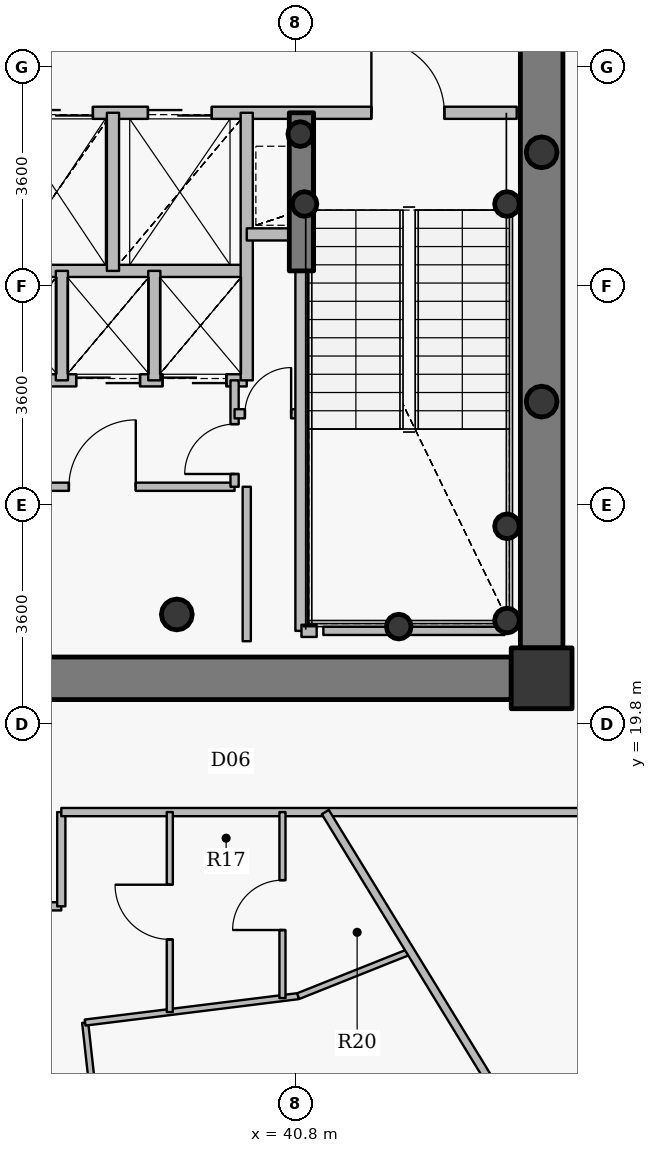
"""IFC4 building model, lengths in metres.
Left out: names, types, materials, properties, quantities, classifications, styles, units other than length and angle.
Written with IfcOpenShell. Run it as: python <this file> out.ifc"""

import sys

from ifc_helpers import new_model, si_unit, direction, frame, frame_2d, origin, origin_2d, place, context, subcontext, project, spatial, rectangle, hollow_circle, extrude, source, transform, mapped, element, fill, save


model = new_model("IFC4")
c1 = context("Model", 3, precision=1e-05, world=origin(), true_north=direction((0.0, 1.0)))
c2 = subcontext(c1, "Body", "Model", "MODEL_VIEW")
j1 = project(units=[si_unit("LENGTHUNIT", "METRE"), si_unit("PLANEANGLEUNIT", "RADIAN")], contexts=[c1])
p1 = place(None, origin())
s1 = spatial("IfcSite", under=j1, at=p1, CompositionType="ELEMENT")
p2 = place(p1, origin())
s2 = spatial("IfcBuilding", under=s1, at=p2, CompositionType="ELEMENT")
p3 = place(p2, frame((0.0, 0.0, 284.25)))
s3 = spatial("IfcBuildingStorey", under=s2, at=p3, CompositionType="ELEMENT", Elevation=284.25)
p4 = place(p3, frame((44.85, 20.55, 0.0), z_axis=(0.0, 0.0, 1.0), x_axis=(1.0, 0.0, 0.0)))
e1 = element("IfcColumn", 1, at=p4, inside=s3, PredefinedType="COLUMN", context=c2, shape_type="SweptSolid", body=[
    extrude(rectangle(XDim=1.0, YDim=1.0, at=origin_2d()), origin(), (0.0, 0.0, 1.0), 3.75),
])
p5 = place(p3, frame((38.85, 21.6, 0.0), z_axis=(0.0, 0.0, 1.0), x_axis=(1.0, 0.0, 0.0)))
e2 = element("IfcColumn", 2, at=p5, inside=s3, PredefinedType="COLUMN", context=c2, shape_type="SweptSolid", body=[
    extrude(hollow_circle(Radius=0.254, WallThickness=0.02, at=origin_2d()), origin(), (0.0, 0.0, 1.0), 3.75),
])
for number, where, z_axis, x_axis in (
    (3, (44.28, 21.5, 0.0), (0.0, 0.0, 1.0), (1.0, 0.0, 0.0)),
    (4, (44.28, 23.05, 0.0), (0.0, 0.0, 1.0), (1.0, 0.0, 0.0)),
    (5, (42.5, 21.4, 0.0), (0.0, 0.0, 1.0), (1.0, 0.0, 0.0)),
    (6, (40.95, 28.35, 0.0), (0.0, 0.0, 1.0), (1.0, 0.0, 0.0)),
    (7, (44.28, 28.35, 0.0), (0.0, 0.0, 1.0), (1.0, 0.0, 0.0)),
    (8, (40.88, 29.5, 0.0), (0.0, 0.0, 1.0), (1.0, 0.0, 0.0)),
):
    element("IfcColumn", number, at=place(p3, frame(where, z_axis=z_axis, x_axis=x_axis)), inside=s3, PredefinedType="COLUMN", context=c2, shape_type="SweptSolid", body=[
        extrude(hollow_circle(Radius=0.203, WallThickness=0.016, at=origin_2d()), origin(), (0.0, 0.0, 1.0), 3.75),
    ])
p6 = place(p3, frame((44.85, 32.95, 0.0), z_axis=(0.0, 0.0, 1.0), x_axis=(0.0, -1.0, 0.0)))
e9 = element("IfcWall", 9, at=p6, inside=s3, PredefinedType="SHEAR", context=c2, shape_type="SweptSolid", body=[
    extrude(rectangle(XDim=11.9, YDim=0.7, at=frame_2d((5.95, 0.0))), origin(), (0.0, 0.0, 1.0), 3.05),
])
p7 = place(p3, frame((44.35, 20.55, 0.0), z_axis=(0.0, 0.0, 1.0), x_axis=(-1.0, 0.0, 0.0)))
e10 = element("IfcWall", 10, at=p7, inside=s3, PredefinedType="SHEAR", context=c2, shape_type="SweptSolid", body=[
    extrude(rectangle(XDim=16.7, YDim=0.7, at=frame_2d((8.35, 0.0))), origin(), (0.0, 0.0, 1.0), 3.05),
])
p8 = place(p7, frame((12.925, 0.0, 0.0)))
e11 = element("IfcOpeningElement", 11, at=p8, cuts=e10, PredefinedType="OPENING", context=c2, shape_type="SweptSolid", body=[
    extrude(rectangle(XDim=1.15, YDim=2.15, at=origin_2d()), frame((0.575, 0.36, 1.075), z_axis=(0.0, -1.0, 0.0), x_axis=(1.0, 0.0, 0.0)), (0.0, 0.0, 1.0), 0.72),
])
p9 = place(p7, frame((9.1, 0.0, 0.0)))
e12 = element("IfcOpeningElement", 12, at=p9, cuts=e10, PredefinedType="OPENING", context=c2, shape_type="SweptSolid", body=[
    extrude(rectangle(XDim=1.15, YDim=2.15, at=origin_2d()), frame((0.575, 0.36, 1.075), z_axis=(0.0, -1.0, 0.0), x_axis=(1.0, 0.0, 0.0)), (0.0, 0.0, 1.0), 0.72),
])
p10 = place(p3, frame((40.9, 27.25, 0.0), z_axis=(0.0, 0.0, 1.0), x_axis=(0.0, 1.0, 0.0)))
e13 = element("IfcWall", 13, at=p10, inside=s3, PredefinedType="SHEAR", context=c2, shape_type="SweptSolid", body=[
    extrude(rectangle(XDim=2.6, YDim=0.4, at=frame_2d((1.3, 0.0))), origin(), (0.0, 0.0, 1.0), 3.1),
])
for number, where, z_axis, x_axis in (
    (14, (44.85, 25.1, 0.0), (0.0, 0.0, 1.0), (1.0, 0.0, 0.0)),
    (15, (44.85, 29.2, 0.0), (0.0, 0.0, 1.0), (1.0, 0.0, 0.0)),
):
    element("IfcColumn", number, at=place(p3, frame(where, z_axis=z_axis, x_axis=x_axis)), inside=s3, PredefinedType="COLUMN", context=c2, shape_type="SweptSolid", body=[
        extrude(hollow_circle(Radius=0.254, WallThickness=0.02, at=origin_2d()), origin(), (0.0, 0.0, 1.0), 3.75),
    ])
p11 = place(p3, frame((35.05, 16.8, 0.0), z_axis=(0.0, 0.0, 1.0), x_axis=(1.0, 0.0, 0.0)))
e16 = element("IfcWall", 16, at=p11, inside=s3, PredefinedType="PARTITIONING", context=c2, shape_type="SweptSolid", body=[
    extrude(rectangle(XDim=1.9, YDim=0.135, at=frame_2d((0.95, 0.0))), origin(), (0.0, 0.0, 1.0), 3.035),
])
p12 = place(p3, frame((35.05, 27.25, 0.0), z_axis=(0.0, 0.0, 1.0), x_axis=(1.0, 0.0, 0.0)))
e17 = element("IfcWall", 17, at=p12, inside=s3, PredefinedType="PARTITIONING", context=c2, shape_type="SweptSolid", body=[
    extrude(rectangle(XDim=4.95, YDim=0.2, at=frame_2d((2.475, 0.0))), origin(), (0.0, 0.0, 1.0), 3.085),
])
p13 = place(p3, frame((35.45, 23.7, 0.0), z_axis=(0.0, 0.0, 1.0), x_axis=(1.0, 0.0, 0.0)))
e18 = element("IfcWall", 18, at=p13, inside=s3, PredefinedType="PARTITIONING", context=c2, shape_type="SweptSolid", body=[
    extrude(rectangle(XDim=4.35, YDim=0.135, at=frame_2d((2.175, 0.0))), origin(), (0.0, 0.0, 1.0), 3.085),
])
p14 = place(p13, frame((1.625, 0.0, 0.0)))
e19 = element("IfcOpeningElement", 19, at=p14, cuts=e18, PredefinedType="OPENING", context=c2, shape_type="SweptSolid", body=[
    extrude(rectangle(XDim=1.1, YDim=2.15, at=origin_2d()), frame((0.55, 0.078, 1.075), z_axis=(0.0, -1.0, 0.0), x_axis=(1.0, 0.0, 0.0)), (0.0, 0.0, 1.0), 0.155),
])
p15 = place(p3, frame((35.45, 25.45, 0.0), z_axis=(0.0, 0.0, 1.0), x_axis=(1.0, 0.0, 0.0)))
e20 = element("IfcWall", 20, at=p15, inside=s3, PredefinedType="PARTITIONING", context=c2, shape_type="SweptSolid", body=[
    extrude(rectangle(XDim=4.55, YDim=0.2, at=frame_2d((2.275, 0.0))), origin(), (0.0, 0.0, 1.0), 3.085),
])
p16 = place(p15, frame((0.25, 0.0, 0.0)))
e21 = element("IfcOpeningElement", 21, at=p16, cuts=e20, PredefinedType="OPENING", context=c2, shape_type="SweptSolid", body=[
    extrude(rectangle(XDim=1.05, YDim=2.15, at=origin_2d()), frame((0.525, 0.11, 1.075), z_axis=(0.0, -1.0, 0.0), x_axis=(1.0, 0.0, 0.0)), (0.0, 0.0, 1.0), 0.22),
])
p17 = place(p15, frame((1.745, 0.0, 0.0)))
e22 = element("IfcOpeningElement", 22, at=p17, cuts=e20, PredefinedType="OPENING", context=c2, shape_type="SweptSolid", body=[
    extrude(rectangle(XDim=1.05, YDim=2.15, at=origin_2d()), frame((0.525, 0.11, 1.075), z_axis=(0.0, -1.0, 0.0), x_axis=(1.0, 0.0, 0.0)), (0.0, 0.0, 1.0), 0.22),
])
p18 = place(p15, frame((3.165, 0.0, 0.0)))
e23 = element("IfcOpeningElement", 23, at=p18, cuts=e20, PredefinedType="OPENING", context=c2, shape_type="SweptSolid", body=[
    extrude(rectangle(XDim=1.05, YDim=2.15, at=origin_2d()), frame((0.525, 0.11, 1.075), z_axis=(0.0, -1.0, 0.0), x_axis=(1.0, 0.0, 0.0)), (0.0, 0.0, 1.0), 0.22),
])
p19 = place(p3, frame((35.95, 29.85, 0.0), z_axis=(0.0, 0.0, 1.0), x_axis=(1.0, 0.0, 0.0)))
e24 = element("IfcWall", 24, at=p19, inside=s3, PredefinedType="PARTITIONING", context=c2, shape_type="SweptSolid", body=[
    extrude(rectangle(XDim=8.49, YDim=0.2, at=frame_2d((4.245, 0.0))), origin(), (0.0, 0.0, 1.0), 3.085),
])
p20 = place(p19, frame((6.1, 0.0, 0.0)))
e25 = element("IfcOpeningElement", 25, at=p20, cuts=e24, PredefinedType="OPENING", context=c2, shape_type="SweptSolid", body=[
    extrude(rectangle(XDim=1.2, YDim=2.15, at=origin_2d()), frame((0.6, 0.11, 1.075), z_axis=(0.0, -1.0, 0.0), x_axis=(1.0, 0.0, 0.0)), (0.0, 0.0, 1.0), 0.22),
])
p21 = place(p19, frame((0.37, 0.0, 0.0)))
e26 = element("IfcOpeningElement", 26, at=p21, cuts=e24, PredefinedType="OPENING", context=c2, shape_type="SweptSolid", body=[
    extrude(rectangle(XDim=1.15, YDim=2.15, at=origin_2d()), frame((0.575, 0.11, 1.075), z_axis=(0.0, -1.0, 0.0), x_axis=(1.0, 0.0, 0.0)), (0.0, 0.0, 1.0), 0.22),
])
p22 = place(p19, frame((2.425, 0.0, 0.0)))
e27 = element("IfcOpeningElement", 27, at=p22, cuts=e24, PredefinedType="OPENING", context=c2, shape_type="SweptSolid", body=[
    extrude(rectangle(XDim=1.05, YDim=2.15, at=origin_2d()), frame((0.525, 0.11, 1.075), z_axis=(0.0, -1.0, 0.0), x_axis=(1.0, 0.0, 0.0)), (0.0, 0.0, 1.0), 0.22),
])
p23 = place(p3, frame((36.95, 16.8, 0.0), z_axis=(0.0, 0.0, 1.0), x_axis=(0.0, 1.0, 0.0)))
e28 = element("IfcWall", 28, at=p23, inside=s3, PredefinedType="PARTITIONING", context=c2, shape_type="SweptSolid", body=[
    extrude(rectangle(XDim=1.55, YDim=0.135, at=frame_2d((0.775, 0.0))), origin(), (0.0, 0.0, 1.0), 3.5),
])
p24 = place(p3, frame((36.95, 18.35, 0.0), z_axis=(0.0, 0.0, 1.0), x_axis=(1.0, 0.0, 0.0)))
e29 = element("IfcWall", 29, at=p24, inside=s3, PredefinedType="PARTITIONING", context=c2, shape_type="SweptSolid", body=[
    extrude(rectangle(XDim=10.1, YDim=0.135, at=frame_2d((5.05, 0.0))), origin(), (0.0, 0.0, 1.0), 3.035),
])
p25 = place(p3, frame((36.96, 25.45, 0.0), z_axis=(0.0, 0.0, 1.0), x_axis=(0.0, 1.0, 0.0)))
e30 = element("IfcWall", 30, at=p25, inside=s3, PredefinedType="PARTITIONING", context=c2, shape_type="SweptSolid", body=[
    extrude(rectangle(XDim=1.8, YDim=0.2, at=frame_2d((0.9, 0.0))), origin(), (0.0, 0.0, 1.0), 3.5),
])
p26 = place(p3, frame((37.342, 14.888, 0.0), z_axis=(0.0, 0.0, 1.0), x_axis=(0.110149295127, -0.993915053102, 0.0)))
e31 = element("IfcWall", 31, at=p26, inside=s3, PredefinedType="PARTITIONING", context=c2, shape_type="SweptSolid", body=[
    extrude(rectangle(XDim=5.222, YDim=0.1, at=frame_2d((2.611, 0.0))), origin(), (0.0, 0.0, 1.0), 2.985),
])
p27 = place(p26, frame((2.161, 0.0, 0.0)))
e32 = element("IfcOpeningElement", 32, at=p27, cuts=e31, PredefinedType="OPENING", context=c2, shape_type="SweptSolid", body=[
    extrude(rectangle(XDim=0.9, YDim=2.1, at=origin_2d()), frame((0.45, 0.06, 1.05), z_axis=(0.0, -1.0, 0.0), x_axis=(1.0, 0.0, 0.0)), (0.0, 0.0, 1.0), 0.12),
])
p28 = place(p3, frame((37.342, 14.888, 0.0), z_axis=(0.0, 0.0, 1.0), x_axis=(0.992393420873, 0.123106856865, 0.0)))
e33 = element("IfcWall", 33, at=p28, inside=s3, PredefinedType="PARTITIONING", context=c2, shape_type="SweptSolid", body=[
    extrude(rectangle(XDim=3.53, YDim=0.1, at=frame_2d((1.765, 0.0))), origin(), (0.0, 0.0, 1.0), 3.035),
])
p29 = place(p3, frame((37.8, 27.25, 0.0), z_axis=(0.0, 0.0, 1.0), x_axis=(0.0, 1.0, 0.0)))
e34 = element("IfcWall", 34, at=p29, inside=s3, PredefinedType="PARTITIONING", context=c2, shape_type="SweptSolid", body=[
    extrude(rectangle(XDim=2.6, YDim=0.2, at=frame_2d((1.3, 0.0))), origin(), (0.0, 0.0, 1.0), 3.5),
])
p30 = place(p3, frame((38.48, 25.45, 0.0), z_axis=(0.0, 0.0, 1.0), x_axis=(0.0, 1.0, 0.0)))
e35 = element("IfcWall", 35, at=p30, inside=s3, PredefinedType="PARTITIONING", context=c2, shape_type="SweptSolid", body=[
    extrude(rectangle(XDim=1.8, YDim=0.2, at=frame_2d((0.9, 0.0))), origin(), (0.0, 0.0, 1.0), 3.5),
])
p31 = place(p3, frame((38.734, 15.061, 0.0), z_axis=(0.0, 0.0, 1.0), x_axis=(0.0, 1.0, 0.0)))
e36 = element("IfcWall", 36, at=p31, inside=s3, PredefinedType="PARTITIONING", context=c2, shape_type="SweptSolid", body=[
    extrude(rectangle(XDim=3.289, YDim=0.1, at=frame_2d((1.645, 0.0))), origin(), (0.0, 0.0, 1.0), 3.5),
])
p32 = place(p31, frame((1.194, 0.0, 0.0)))
e37 = element("IfcOpeningElement", 37, at=p32, cuts=e36, PredefinedType="OPENING", context=c2, shape_type="SweptSolid", body=[
    extrude(rectangle(XDim=0.9, YDim=2.1, at=origin_2d()), frame((0.45, 0.06, 1.05), z_axis=(0.0, -1.0, 0.0), x_axis=(1.0, 0.0, 0.0)), (0.0, 0.0, 1.0), 0.12),
])
p33 = place(p3, frame((39.8, 23.7, 0.0), z_axis=(0.0, 0.0, 1.0), x_axis=(0.0, 1.0, 0.0)))
e38 = element("IfcWall", 38, at=p33, inside=s3, PredefinedType="PARTITIONING", context=c2, shape_type="SweptSolid", body=[
    extrude(rectangle(XDim=1.75, YDim=0.135, at=frame_2d((0.875, 0.0))), origin(), (0.0, 0.0, 1.0), 3.5),
])
p34 = place(p33, frame((0.21, 0.0, 0.0)))
e39 = element("IfcOpeningElement", 39, at=p34, cuts=e38, PredefinedType="OPENING", context=c2, shape_type="SweptSolid", body=[
    extrude(rectangle(XDim=0.82, YDim=2.1, at=origin_2d()), frame((0.41, 0.078, 1.05), z_axis=(0.0, -1.0, 0.0), x_axis=(1.0, 0.0, 0.0)), (0.0, 0.0, 1.0), 0.155),
])
p35 = place(p3, frame((39.8, 24.9, 0.0), z_axis=(0.0, 0.0, 1.0), x_axis=(1.0, 0.0, 0.0)))
e40 = element("IfcWall", 40, at=p35, inside=s3, PredefinedType="PARTITIONING", context=c2, shape_type="SweptSolid", body=[
    extrude(rectangle(XDim=1.1, YDim=0.15, at=frame_2d((0.55, 0.0))), origin(), (0.0, 0.0, 1.0), 3.5),
])
p36 = place(p35, frame((0.17, 0.0, 0.0)))
e41 = element("IfcOpeningElement", 41, at=p36, cuts=e40, PredefinedType="OPENING", context=c2, shape_type="SweptSolid", body=[
    extrude(rectangle(XDim=0.76, YDim=2.1, at=origin_2d()), frame((0.38, 0.085, 1.05), z_axis=(0.0, -1.0, 0.0), x_axis=(1.0, 0.0, 0.0)), (0.0, 0.0, 1.0), 0.17),
])
p37 = place(p3, frame((40.0, 25.45, 0.0), z_axis=(0.0, 0.0, 1.0), x_axis=(0.0, 1.0, 0.0)))
e42 = element("IfcWall", 42, at=p37, inside=s3, PredefinedType="PARTITIONING", context=c2, shape_type="SweptSolid", body=[
    extrude(rectangle(XDim=4.4, YDim=0.2, at=frame_2d((2.2, 0.0))), origin(), (0.0, 0.0, 1.0), 3.5),
])
p38 = place(p3, frame((40.0, 27.85, 0.0), z_axis=(0.0, 0.0, 1.0), x_axis=(1.0, 0.0, 0.0)))
e43 = element("IfcWall", 43, at=p38, inside=s3, PredefinedType="PARTITIONING", context=c2, shape_type="SweptSolid", body=[
    extrude(rectangle(XDim=0.9, YDim=0.2, at=frame_2d((0.45, 0.0))), origin(), (0.0, 0.0, 1.0), 3.5),
])
p39 = place(p3, frame((40.587, 15.291, 0.0), z_axis=(0.0, 0.0, 1.0), x_axis=(0.0, 1.0, 0.0)))
e44 = element("IfcWall", 44, at=p39, inside=s3, PredefinedType="PARTITIONING", context=c2, shape_type="SweptSolid", body=[
    extrude(rectangle(XDim=3.059, YDim=0.1, at=frame_2d((1.53, 0.0))), origin(), (0.0, 0.0, 1.0), 3.035),
])
p40 = place(p39, frame((1.119, 0.0, 0.0)))
e45 = element("IfcOpeningElement", 45, at=p40, cuts=e44, PredefinedType="OPENING", context=c2, shape_type="SweptSolid", body=[
    extrude(rectangle(XDim=0.82, YDim=2.1, at=origin_2d()), frame((0.41, 0.06, 1.05), z_axis=(0.0, -1.0, 0.0), x_axis=(1.0, 0.0, 0.0)), (0.0, 0.0, 1.0), 0.12),
])
p41 = place(p3, frame((40.845, 15.323, 0.0), z_axis=(0.0, 0.0, 1.0), x_axis=(0.928797929692, 0.370586569913, 0.0)))
e46 = element("IfcWall", 46, at=p41, inside=s3, PredefinedType="PARTITIONING", context=c2, shape_type="SweptSolid", body=[
    extrude(rectangle(XDim=1.99, YDim=0.1, at=frame_2d((0.995, 0.0))), origin(), (0.0, 0.0, 1.0), 3.035),
])
p42 = place(p3, frame((40.9, 21.33, 0.0), z_axis=(0.0, 0.0, 1.0), x_axis=(0.0, 1.0, 0.0)))
e47 = element("IfcWall", 47, at=p42, inside=s3, PredefinedType="PARTITIONING", context=c2, shape_type="SweptSolid", body=[
    extrude(rectangle(XDim=5.91, YDim=0.2, at=frame_2d((2.955, 0.0))), origin(), (0.0, 0.0, 1.0), 3.035),
])
p43 = place(p3, frame((40.9, 21.33, 0.0), z_axis=(0.0, 0.0, 1.0), x_axis=(1.0, 0.0, 0.0)))
e48 = element("IfcWall", 48, at=p43, inside=s3, PredefinedType="PARTITIONING", context=c2, shape_type="SweptSolid", body=[
    extrude(rectangle(XDim=0.25, YDim=0.2, at=frame_2d((0.125, 0.0))), origin(), (0.0, 0.0, 1.0), 3.035),
])
p44 = place(p3, frame((41.292, 18.35, 0.0), z_axis=(0.0, 0.0, 1.0), x_axis=(0.521891606098, -0.853011812043, 0.0)))
e49 = element("IfcWall", 49, at=p44, inside=s3, PredefinedType="PARTITIONING", context=c2, shape_type="SweptSolid", body=[
    extrude(rectangle(XDim=8.25, YDim=0.135, at=frame_2d((4.125, 0.0))), origin(), (0.0, 0.0, 1.0), 2.985),
])
p45 = place(p3, frame((44.24, 21.33, 0.0), z_axis=(0.0, 0.0, 1.0), x_axis=(-1.0, 0.0, 0.0)))
e50 = element("IfcWall", 50, at=p45, inside=s3, PredefinedType="PARTITIONING", context=c2, shape_type="SweptSolid", body=[
    extrude(rectangle(XDim=2.98, YDim=0.135, at=frame_2d((1.49, 0.0))), origin(), (0.0, 0.0, 1.0), 3.035),
])
p46 = place(p3, frame((40.0, 23.7, 0.0), z_axis=(0.0, 0.0, 1.0), x_axis=(0.0, -1.0, 0.0)))
e51 = element("IfcWall", 51, at=p46, inside=s3, PredefinedType="PARTITIONING", context=c2, shape_type="SweptSolid", body=[
    extrude(rectangle(XDim=2.54, YDim=0.135, at=frame_2d((1.27, 0.0))), origin(), (0.0, 0.0, 1.0), 3.035),
])
p47 = place(p3, frame((44.36, 20.2, 0.0), z_axis=(0.0, 0.0, 1.0), x_axis=(1.0, 0.0, 0.0)))
e52 = element("IfcWall", 52, at=p47, inside=s3, PredefinedType="PARTITIONING", context=c2, shape_type="SweptSolid", body=[
    extrude(rectangle(XDim=0.84, YDim=0.135, at=frame_2d((0.42, 0.0))), origin(), (0.0, 0.0, 1.0), 3.035),
])
p48 = place(p3, frame((45.2, 20.508, 0.0), z_axis=(0.0, 0.0, 1.0), x_axis=(0.0, 1.0, 0.0)))
e53 = element("IfcWall", 53, at=p48, inside=s3, PredefinedType="PARTITIONING", context=c2, shape_type="SweptSolid", body=[
    extrude(rectangle(XDim=0.532, YDim=0.135, at=frame_2d((0.266, 0.0))), origin(), (0.0, 0.0, 1.0), 3.5),
])
m1 = source(origin(), c2, "Body", "SweptSolid", [
    extrude(rectangle(XDim=1.2, YDim=2.15, at=origin_2d()), frame((0.6, 0.025, 1.075), z_axis=(0.0, -1.0, 0.0), x_axis=(1.0, 0.0, 0.0)), (0.0, 0.0, 1.0), 0.05),
])
p49 = place(p20, origin())
e54 = element("IfcDoor", 54, at=p49, inside=s3, OperationType="SINGLE_SWING_LEFT", PredefinedType="DOOR", context=c2, shape_type="MappedRepresentation", body=[
    mapped(m1, transform((0.0, 0.0, 0.0), x_axis=(1.0, 0.0, 0.0), y_axis=(0.0, 1.0, 0.0), z_axis=(0.0, 0.0, 1.0), scale=1.0)),
])
fill(e25, e54)
m2 = source(origin(), c2, "Body", "SweptSolid", [
    extrude(rectangle(XDim=1.15, YDim=2.15, at=origin_2d()), frame((0.575, 0.025, 1.075), z_axis=(0.0, -1.0, 0.0), x_axis=(1.0, 0.0, 0.0)), (0.0, 0.0, 1.0), 0.05),
])
p50 = place(p21, origin())
e55 = element("IfcDoor", 55, at=p50, inside=s3, OperationType="DOUBLE_DOOR_SLIDING", PredefinedType="USERDEFINED", context=c2, shape_type="MappedRepresentation", body=[
    mapped(m2, transform((0.0, 0.0, 0.0), x_axis=(1.0, 0.0, 0.0), y_axis=(0.0, 1.0, 0.0), z_axis=(0.0, 0.0, 1.0), scale=1.0)),
])
fill(e26, e55)
m3 = source(origin(), c2, "Body", "SweptSolid", [
    extrude(rectangle(XDim=1.05, YDim=2.15, at=origin_2d()), frame((0.525, 0.025, 1.075), z_axis=(0.0, -1.0, 0.0), x_axis=(1.0, 0.0, 0.0)), (0.0, 0.0, 1.0), 0.05),
])
p51 = place(p22, origin())
e56 = element("IfcDoor", 56, at=p51, inside=s3, OperationType="DOUBLE_DOOR_SLIDING", PredefinedType="USERDEFINED", context=c2, shape_type="MappedRepresentation", body=[
    mapped(m3, transform((0.0, 0.0, 0.0), x_axis=(1.0, 0.0, 0.0), y_axis=(0.0, 1.0, 0.0), z_axis=(0.0, 0.0, 1.0), scale=1.0)),
])
fill(e27, e56)
p52 = place(p17, origin())
e57 = element("IfcDoor", 57, at=p52, inside=s3, OperationType="DOUBLE_DOOR_SLIDING", PredefinedType="USERDEFINED", context=c2, shape_type="MappedRepresentation", body=[
    mapped(m3, transform((0.0, 0.0, 0.0), x_axis=(1.0, 0.0, 0.0), y_axis=(0.0, 1.0, 0.0), z_axis=(0.0, 0.0, 1.0), scale=1.0)),
])
fill(e22, e57)
p53 = place(p18, origin())
e58 = element("IfcDoor", 58, at=p53, inside=s3, OperationType="DOUBLE_DOOR_SLIDING", PredefinedType="USERDEFINED", context=c2, shape_type="MappedRepresentation", body=[
    mapped(m3, transform((0.0, 0.0, 0.0), x_axis=(1.0, 0.0, 0.0), y_axis=(0.0, 1.0, 0.0), z_axis=(0.0, 0.0, 1.0), scale=1.0)),
])
fill(e23, e58)
m4 = source(origin(), c2, "Body", "SweptSolid", [
    extrude(rectangle(XDim=0.9, YDim=2.1, at=origin_2d()), frame((0.45, 0.025, 1.05), z_axis=(0.0, -1.0, 0.0), x_axis=(1.0, 0.0, 0.0)), (0.0, 0.0, 1.0), 0.05),
])
p54 = place(p32, origin())
e59 = element("IfcDoor", 59, at=p54, inside=s3, OperationType="SINGLE_SWING_RIGHT", PredefinedType="DOOR", context=c2, shape_type="MappedRepresentation", body=[
    mapped(m4, transform((0.0, 0.0, 0.0), x_axis=(1.0, 0.0, 0.0), y_axis=(0.0, 1.0, 0.0), z_axis=(0.0, 0.0, 1.0), scale=1.0)),
])
fill(e37, e59)
m5 = source(origin(), c2, "Body", "SweptSolid", [
    extrude(rectangle(XDim=0.82, YDim=2.1, at=origin_2d()), frame((0.41, 0.025, 1.05), z_axis=(0.0, -1.0, 0.0), x_axis=(1.0, 0.0, 0.0)), (0.0, 0.0, 1.0), 0.05),
])
p55 = place(p40, origin())
e60 = element("IfcDoor", 60, at=p55, inside=s3, OperationType="SINGLE_SWING_LEFT", PredefinedType="DOOR", context=c2, shape_type="MappedRepresentation", body=[
    mapped(m5, transform((0.0, 0.0, 0.0), x_axis=(1.0, 0.0, 0.0), y_axis=(0.0, 1.0, 0.0), z_axis=(0.0, 0.0, 1.0), scale=1.0)),
])
fill(e45, e60)
m6 = source(origin(), c2, "Body", "SweptSolid", [
    extrude(rectangle(XDim=1.1, YDim=2.15, at=origin_2d()), frame((0.55, 0.025, 1.075), z_axis=(0.0, -1.0, 0.0), x_axis=(1.0, 0.0, 0.0)), (0.0, 0.0, 1.0), 0.05),
])
p56 = place(p14, origin())
e61 = element("IfcDoor", 61, at=p56, inside=s3, OperationType="SINGLE_SWING_RIGHT", PredefinedType="DOOR", context=c2, shape_type="MappedRepresentation", body=[
    mapped(m6, transform((0.0, 0.0, 0.0), x_axis=(1.0, 0.0, 0.0), y_axis=(0.0, 1.0, 0.0), z_axis=(0.0, 0.0, 1.0), scale=1.0)),
])
fill(e19, e61)
p57 = place(p34, origin())
e62 = element("IfcDoor", 62, at=p57, inside=s3, OperationType="SINGLE_SWING_LEFT", PredefinedType="DOOR", context=c2, shape_type="MappedRepresentation", body=[
    mapped(m5, transform((0.0, 0.0, 0.0), x_axis=(1.0, 0.0, 0.0), y_axis=(0.0, 1.0, 0.0), z_axis=(0.0, 0.0, 1.0), scale=1.0)),
])
fill(e39, e62)
m7 = source(origin(), c2, "Body", "SweptSolid", [
    extrude(rectangle(XDim=0.76, YDim=2.1, at=origin_2d()), frame((0.38, 0.025, 1.05), z_axis=(0.0, -1.0, 0.0), x_axis=(1.0, 0.0, 0.0)), (0.0, 0.0, 1.0), 0.05),
])
p58 = place(p36, origin())
e63 = element("IfcDoor", 63, at=p58, inside=s3, OperationType="SINGLE_SWING_RIGHT", PredefinedType="DOOR", context=c2, shape_type="MappedRepresentation", body=[
    mapped(m7, transform((0.0, 0.0, 0.0), x_axis=(1.0, 0.0, 0.0), y_axis=(0.0, 1.0, 0.0), z_axis=(0.0, 0.0, 1.0), scale=1.0)),
])
fill(e41, e63)
save(model, sys.argv[1])
